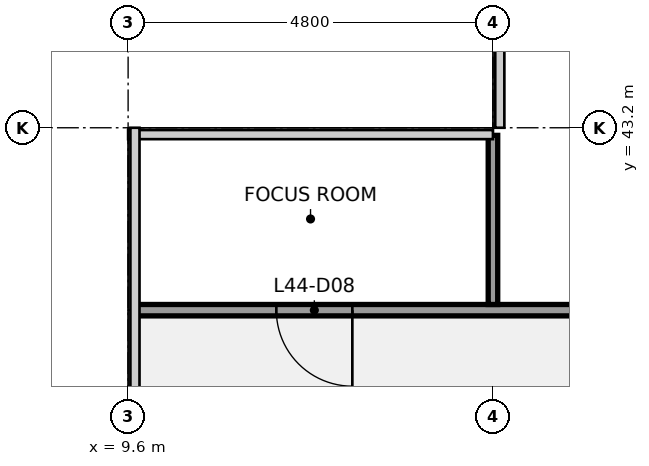
"""IFC4 building model, lengths in metres.
Left out: names, types, materials, properties, quantities, classifications, styles, units other than length and angle.
Written with IfcOpenShell. Run it as: python <this file> out.ifc"""

import sys

from ifc_helpers import new_model, si_unit, direction, frame, frame_2d, origin, place, context, subcontext, project, spatial, rectangle, extrude, element, fill, save


model = new_model("IFC4")
c1 = context("Model", 3, precision=1e-05, world=origin(), true_north=direction((0.0, 1.0)))
c2 = subcontext(c1, "Body", "Model", "MODEL_VIEW")
j1 = project(units=[si_unit("LENGTHUNIT", "METRE"), si_unit("PLANEANGLEUNIT", "RADIAN")], contexts=[c1])
p1 = place(None, origin())
s1 = spatial("IfcSite", under=j1, at=p1, CompositionType="ELEMENT")
p2 = place(p1, origin())
s2 = spatial("IfcBuilding", under=s1, at=p2, CompositionType="ELEMENT")
p3 = place(p2, frame((0.0, 0.0, 205.2)))
s3 = spatial("IfcBuildingStorey", under=s2, at=p3, CompositionType="ELEMENT", Elevation=205.2)
p4 = place(p3, frame((9.7, 40.8, 0.0), z_axis=(0.0, 0.0, 1.0), x_axis=(1.0, 0.0, 0.0)))
e1 = element("IfcWall", 1, at=p4, inside=s3, PredefinedType="PARTITIONING", context=c2, shape_type="SweptSolid", body=[
    extrude(rectangle(XDim=9.575, YDim=0.15, at=frame_2d((4.788, 0.0))), origin(), (0.0, 0.0, 1.0), 2.849),
])
p5 = place(p4, frame((1.85, 0.0, 0.0)))
e2 = element("IfcOpeningElement", 2, at=p5, cuts=e1, PredefinedType="OPENING", context=c2, shape_type="SweptSolid", body=[
    extrude(rectangle(XDim=1.0, YDim=2.1, at=frame_2d((0.5, 1.05))), frame((0.0, 0.085, 0.0), z_axis=(0.0, -1.0, 0.0), x_axis=(1.0, 0.0, 0.0)), (0.0, 0.0, 1.0), 0.17),
])
p6 = place(p4, frame((6.6, 0.0, 0.0)))
e3 = element("IfcOpeningElement", 3, at=p6, cuts=e1, PredefinedType="OPENING", context=c2, shape_type="SweptSolid", body=[
    extrude(rectangle(XDim=1.0, YDim=2.1, at=frame_2d((0.5, 1.05))), frame((0.0, 0.085, 0.0), z_axis=(0.0, -1.0, 0.0), x_axis=(1.0, 0.0, 0.0)), (0.0, 0.0, 1.0), 0.17),
])
p7 = place(p3, frame((14.4, 40.875, 0.0), z_axis=(0.0, 0.0, 1.0), x_axis=(0.0, 1.0, 0.0)))
e4 = element("IfcWall", 4, at=p7, inside=s3, PredefinedType="PARTITIONING", context=c2, shape_type="SweptSolid", body=[
    extrude(rectangle(XDim=2.225, YDim=0.125, at=frame_2d((1.113, 0.0))), origin(), (0.0, 0.0, 1.0), 2.849),
])
p8 = place(p5, origin())
e5 = element("IfcDoor", 5, at=p8, inside=s3, OperationType="SINGLE_SWING_RIGHT", PredefinedType="DOOR", context=c2, shape_type="SweptSolid", body=[
    extrude(rectangle(XDim=1.0, YDim=2.1, at=frame_2d((0.5, 1.05))), frame((0.0, 0.025, 0.0), z_axis=(0.0, -1.0, 0.0), x_axis=(1.0, 0.0, 0.0)), (0.0, 0.0, 1.0), 0.05),
])
fill(e2, e5)
save(model, sys.argv[1])
